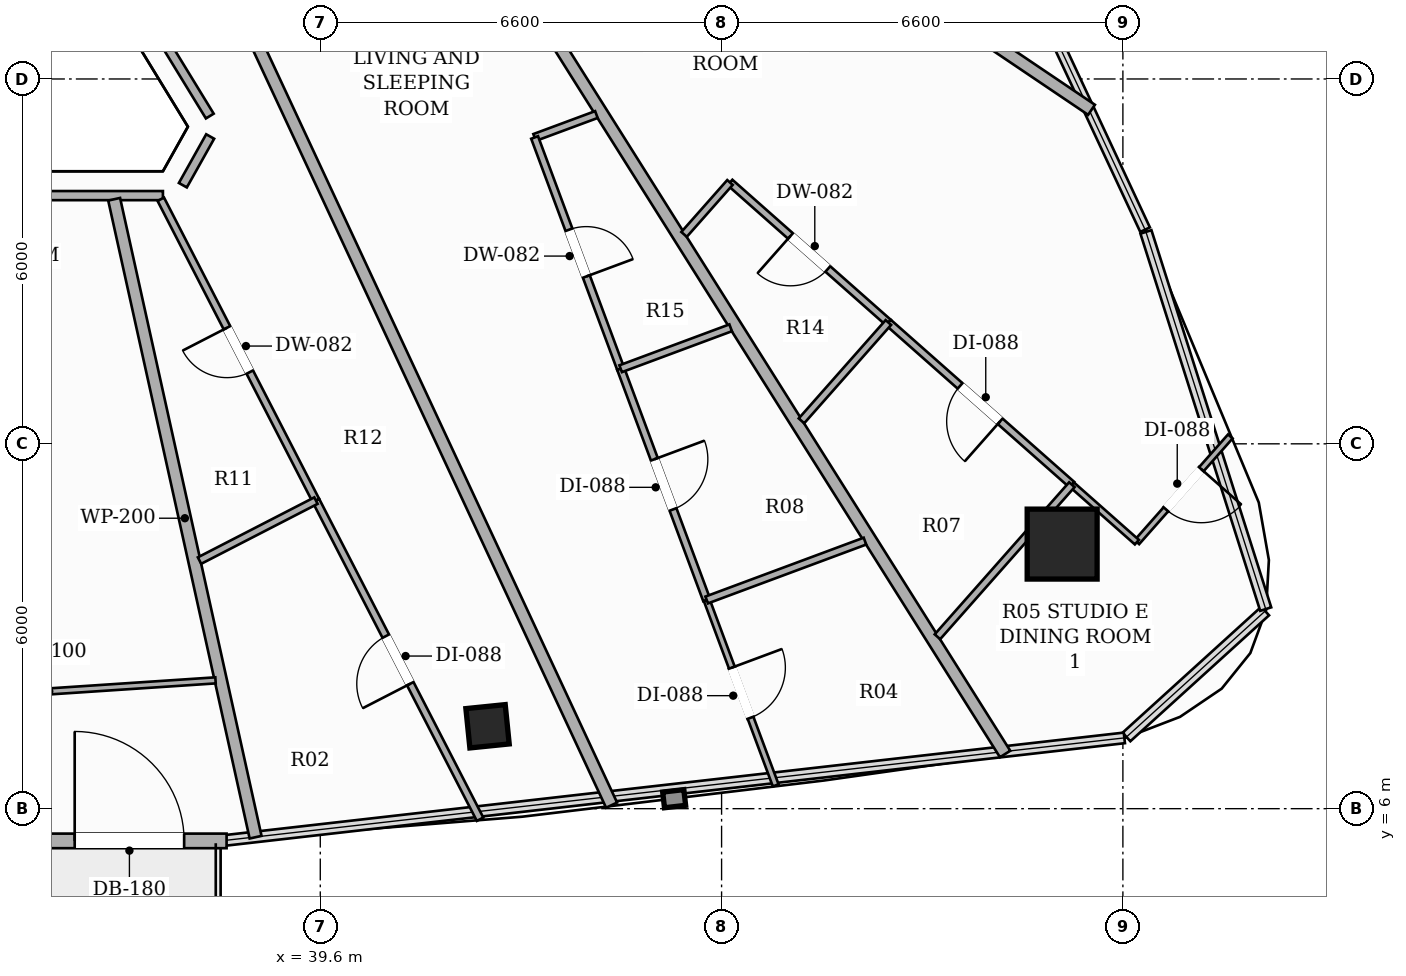
"""IFC4 building model, lengths in metres.
Left out: names, types, materials, properties, quantities, classifications, styles, units other than length and angle.
Written with IfcOpenShell. Run it as: python <this file> out.ifc"""

import sys

from ifc_helpers import new_model, si_unit, direction, frame, frame_2d, origin, origin_2d, place, context, subcontext, project, spatial, rectangle, hollow_rectangle, extrude, element, fill, save


model = new_model("IFC4")
c1 = context("Model", 3, precision=1e-05, world=origin(), true_north=direction((0.0, 1.0)))
c2 = subcontext(c1, "Body", "Model", "MODEL_VIEW")
j1 = project(units=[si_unit("LENGTHUNIT", "METRE"), si_unit("PLANEANGLEUNIT", "RADIAN")], contexts=[c1])
p1 = place(None, origin())
s1 = spatial("IfcSite", under=j1, at=p1, CompositionType="ELEMENT")
p2 = place(p1, origin())
s2 = spatial("IfcBuilding", under=s1, at=p2, CompositionType="ELEMENT")
p3 = place(p2, frame((0.0, 0.0, 256.85)))
s3 = spatial("IfcBuildingStorey", under=s2, at=p3, CompositionType="ELEMENT", Elevation=256.85)
p4 = place(p3, frame((51.801, 10.351, 0.0), z_axis=(0.0, 0.0, 1.0), x_axis=(1.0, 0.0, 0.0)))
e1 = element("IfcColumn", 1, at=p4, inside=s3, PredefinedType="COLUMN", context=c2, shape_type="SweptSolid", body=[
    extrude(hollow_rectangle(XDim=1.15, YDim=1.15, WallThickness=0.036, at=origin_2d()), origin(), (0.0, 0.0, 1.0), 3.3),
])
p5 = place(p3, frame((42.351, 7.355, 0.0), z_axis=(0.0, 0.0, 1.0), x_axis=(0.994880708829, 0.101056297183, 0.0)))
e2 = element("IfcColumn", 2, at=p5, inside=s3, PredefinedType="COLUMN", context=c2, shape_type="SweptSolid", body=[
    extrude(hollow_rectangle(XDim=0.65, YDim=0.65, WallThickness=0.022, at=origin_2d()), origin(), (0.0, 0.0, 1.0), 3.3),
])
p6 = place(p3, frame((27.941, 5.47, 0.0), z_axis=(0.0, 0.0, 1.0), x_axis=(1.0, 0.0, 0.0)))
e3 = element("IfcWall", 3, at=p6, inside=s3, PredefinedType="SOLIDWALL", context=c2, shape_type="SweptSolid", body=[
    extrude(rectangle(XDim=10.118, YDim=0.24, at=frame_2d((5.059, 0.0))), origin(), (0.0, 0.0, 1.0), 2.624),
])
p7 = place(p6, frame((7.62, 0.0, 0.0)))
e4 = element("IfcOpeningElement", 4, at=p7, cuts=e3, PredefinedType="OPENING", context=c2, shape_type="SweptSolid", body=[
    extrude(rectangle(XDim=1.8, YDim=2.2, at=frame_2d((0.9, 1.1))), frame((0.0, 0.13, 0.0), z_axis=(0.0, -1.0, 0.0), x_axis=(1.0, 0.0, 0.0)), (0.0, 0.0, 1.0), 0.26),
])
p8 = place(p3, frame((33.866, 23.79, 0.0), z_axis=(0.0, 0.0, 1.0), x_axis=(0.522011859837, -0.852938226479, 0.0)))
e5 = element("IfcWall", 5, at=p8, inside=s3, PredefinedType="PARTITIONING", context=c2, shape_type="SweptSolid", body=[
    extrude(rectangle(XDim=7.504, YDim=0.15, at=frame_2d((3.752, 0.0))), origin(), (0.0, 0.0, 1.0), 2.773),
])
p9 = place(p3, frame((37.789, 17.054, 0.0), z_axis=(0.0, 0.0, 1.0), x_axis=(-0.488935266506, -0.872320070368, 0.0)))
e6 = element("IfcWall", 6, at=p9, inside=s3, PredefinedType="PARTITIONING", context=c2, shape_type="SweptSolid", body=[
    extrude(rectangle(XDim=0.918, YDim=0.15, at=frame_2d((0.459, 0.0))), origin(), (0.0, 0.0, 1.0), 3.06),
])
p10 = place(p3, frame((37.012, 16.082, 0.0), z_axis=(0.0, 0.0, 1.0), x_axis=(-1.0, 0.0, 0.0)))
e7 = element("IfcWall", 7, at=p10, inside=s3, PredefinedType="PARTITIONING", context=c2, shape_type="SweptSolid", body=[
    extrude(rectangle(XDim=8.024, YDim=0.15, at=frame_2d((4.012, 0.0))), origin(), (0.0, 0.0, 1.0), 2.773),
])
p11 = place(p3, frame((36.21, 16.022, 0.0), z_axis=(0.0, 0.0, 1.0), x_axis=(0.216451711791, -0.976293325012, 0.0)))
e8 = element("IfcWall", 8, at=p11, inside=s3, PredefinedType="PARTITIONING", context=c2, shape_type="SweptSolid", body=[
    extrude(rectangle(XDim=10.746, YDim=0.2, at=frame_2d((5.373, 0.0))), origin(), (0.0, 0.0, 1.0), 2.492),
])
p12 = place(p3, frame((52.284, 17.493, 0.0), z_axis=(0.0, 0.0, 1.0), x_axis=(-0.829053532208, 0.559169241584, 0.0)))
e9 = element("IfcWall", 9, at=p12, inside=s3, PredefinedType="PARTITIONING", context=c2, shape_type="SweptSolid", body=[
    extrude(rectangle(XDim=12.031, YDim=0.2, at=frame_2d((6.015, 0.0))), origin(), (0.0, 0.0, 1.0), 2.492),
])
p13 = place(p3, frame((50.863, 6.899, 0.0), z_axis=(0.0, 0.0, 1.0), x_axis=(-0.532843438342, 0.846213844259, 0.0)))
e10 = element("IfcWall", 10, at=p13, inside=s3, PredefinedType="PARTITIONING", context=c2, shape_type="SweptSolid", body=[
    extrude(rectangle(XDim=19.961, YDim=0.2, at=frame_2d((9.98, 0.0))), origin(), (0.0, 0.0, 1.0), 2.492),
])
p14 = place(p3, frame((44.391, 6.058, 0.0), z_axis=(0.0, 0.0, 1.0), x_axis=(-0.422434507673, 0.906393450289, 0.0)))
e11 = element("IfcWall", 11, at=p14, inside=s3, PredefinedType="PARTITIONING", context=c2, shape_type="SweptSolid", body=[
    extrude(rectangle(XDim=19.563, YDim=0.2, at=frame_2d((9.782, 0.0))), origin(), (0.0, 0.0, 1.0), 2.492),
])
p15 = place(p3, frame((37.877, 8.11, 0.0), z_axis=(0.0, 0.0, 1.0), x_axis=(-0.997794804299, -0.066374155471, 0.0)))
e12 = element("IfcWall", 12, at=p15, inside=s3, PredefinedType="PARTITIONING", context=c2, shape_type="SweptSolid", body=[
    extrude(rectangle(XDim=10.851, YDim=0.1, at=frame_2d((5.425, 0.0))), origin(), (0.0, 0.0, 1.0), 2.492),
])
p16 = place(p15, frame((5.581, 0.0, 0.0)))
e13 = element("IfcOpeningElement", 13, at=p16, cuts=e12, PredefinedType="OPENING", context=c2, shape_type="SweptSolid", body=[
    extrude(rectangle(XDim=0.88, YDim=2.1, at=frame_2d((0.44, 1.05))), frame((0.0, 0.06, 0.0), z_axis=(0.0, -1.0, 0.0), x_axis=(1.0, 0.0, 0.0)), (0.0, 0.0, 1.0), 0.12),
])
p17 = place(p3, frame((48.943, 13.995, 0.0), z_axis=(0.0, 0.0, 1.0), x_axis=(-0.749231040751, 0.662308725275, 0.0)))
e14 = element("IfcWall", 14, at=p17, inside=s3, PredefinedType="PARTITIONING", context=c2, shape_type="SweptSolid", body=[
    extrude(rectangle(XDim=3.477, YDim=0.12, at=frame_2d((1.739, 0.0))), origin(), (0.0, 0.0, 1.0), 2.565),
])
p18 = place(p17, frame((1.329, 0.0, 0.0)))
e15 = element("IfcOpeningElement", 15, at=p18, cuts=e14, PredefinedType="OPENING", context=c2, shape_type="SweptSolid", body=[
    extrude(rectangle(XDim=0.82, YDim=2.1, at=frame_2d((0.41, 1.05))), frame((0.0, 0.07, 0.0), z_axis=(0.0, -1.0, 0.0), x_axis=(1.0, 0.0, 0.0)), (0.0, 0.0, 1.0), 0.14),
])
p19 = place(p3, frame((46.338, 16.298, 0.0), z_axis=(0.0, 0.0, 1.0), x_axis=(-0.662287293934, -0.749249985181, 0.0)))
e16 = element("IfcWall", 16, at=p19, inside=s3, PredefinedType="PARTITIONING", context=c2, shape_type="SweptSolid", body=[
    extrude(rectangle(XDim=1.14, YDim=0.12, at=frame_2d((0.57, 0.0))), origin(), (0.0, 0.0, 1.0), 3.06),
])
p20 = place(p3, frame((51.961, 11.328, 0.0), z_axis=(0.0, 0.0, 1.0), x_axis=(-0.749289212621, 0.662242913024, 0.0)))
e17 = element("IfcWall", 17, at=p20, inside=s3, PredefinedType="PARTITIONING", context=c2, shape_type="SweptSolid", body=[
    extrude(rectangle(XDim=4.028, YDim=0.12, at=frame_2d((2.014, 0.0))), origin(), (0.0, 0.0, 1.0), 2.492),
])
p21 = place(p20, frame((1.574, 0.0, 0.0)))
e18 = element("IfcOpeningElement", 18, at=p21, cuts=e17, PredefinedType="OPENING", context=c2, shape_type="SweptSolid", body=[
    extrude(rectangle(XDim=0.88, YDim=2.1, at=frame_2d((0.44, 1.05))), frame((0.0, 0.07, 0.0), z_axis=(0.0, -1.0, 0.0), x_axis=(1.0, 0.0, 0.0)), (0.0, 0.0, 1.0), 0.14),
])
p22 = place(p3, frame((54.567, 12.122, 0.0), z_axis=(0.0, 0.0, 1.0), x_axis=(-0.662212906575, -0.749315732095, 0.0)))
e19 = element("IfcWall", 19, at=p22, inside=s3, PredefinedType="PARTITIONING", context=c2, shape_type="SweptSolid", body=[
    extrude(rectangle(XDim=2.321, YDim=0.1, at=frame_2d((1.16, 0.0))), origin(), (0.0, 0.0, 1.0), 3.06),
])
p23 = place(p22, frame((0.72, 0.0, 0.0)))
e20 = element("IfcOpeningElement", 20, at=p23, cuts=e19, PredefinedType="OPENING", context=c2, shape_type="SweptSolid", body=[
    extrude(rectangle(XDim=0.88, YDim=2.1, at=frame_2d((0.44, 1.05))), frame((0.0, 0.06, 0.0), z_axis=(0.0, -1.0, 0.0), x_axis=(1.0, 0.0, 0.0)), (0.0, 0.0, 1.0), 0.12),
])
p24 = place(p3, frame((53.03, 10.383, 0.0), z_axis=(0.0, 0.0, 1.0), x_axis=(-0.749313288423, 0.66221567166, 0.0)))
e21 = element("IfcWall", 21, at=p24, inside=s3, PredefinedType="PARTITIONING", context=c2, shape_type="SweptSolid", body=[
    extrude(rectangle(XDim=1.427, YDim=0.1, at=frame_2d((0.713, 0.0))), origin(), (0.0, 0.0, 1.0), 2.492),
])
p25 = place(p3, frame((48.943, 13.995, 0.0), z_axis=(0.0, 0.0, 1.0), x_axis=(-0.662212567735, -0.749316031547, 0.0)))
e22 = element("IfcWall", 22, at=p25, inside=s3, PredefinedType="PARTITIONING", context=c2, shape_type="SweptSolid", body=[
    extrude(rectangle(XDim=2.158, YDim=0.12, at=frame_2d((1.079, 0.0))), origin(), (0.0, 0.0, 1.0), 2.565),
])
p26 = place(p3, frame((51.961, 11.328, 0.0), z_axis=(0.0, 0.0, 1.0), x_axis=(-0.662327669466, -0.74921429395, 0.0)))
e23 = element("IfcWall", 23, at=p26, inside=s3, PredefinedType="PARTITIONING", context=c2, shape_type="SweptSolid", body=[
    extrude(rectangle(XDim=3.338, YDim=0.12, at=frame_2d((1.669, 0.0))), origin(), (0.0, 0.0, 1.0), 2.492),
])
p27 = place(p3, frame((44.141, 17.415, 0.0), z_axis=(0.0, 0.0, 1.0), x_axis=(-0.937563848777, -0.347813210599, 0.0)))
e24 = element("IfcWall", 24, at=p27, inside=s3, PredefinedType="PARTITIONING", context=c2, shape_type="SweptSolid", body=[
    extrude(rectangle(XDim=1.084, YDim=0.12, at=frame_2d((0.542, 0.0))), origin(), (0.0, 0.0, 1.0), 2.773),
])
p28 = place(p3, frame((43.125, 17.038, 0.0), z_axis=(0.0, 0.0, 1.0), x_axis=(0.348728795746, -0.937223680355, 0.0)))
e25 = element("IfcWall", 25, at=p28, inside=s3, PredefinedType="PARTITIONING", context=c2, shape_type="SweptSolid", body=[
    extrude(rectangle(XDim=4.058, YDim=0.12, at=frame_2d((2.029, 0.0))), origin(), (0.0, 0.0, 1.0), 2.773),
])
p29 = place(p28, frame((1.619, 0.0, 0.0)))
e26 = element("IfcOpeningElement", 26, at=p29, cuts=e25, PredefinedType="OPENING", context=c2, shape_type="SweptSolid", body=[
    extrude(rectangle(XDim=0.82, YDim=2.1, at=frame_2d((0.41, 1.05))), frame((0.0, 0.07, 0.0), z_axis=(0.0, -1.0, 0.0), x_axis=(1.0, 0.0, 0.0)), (0.0, 0.0, 1.0), 0.14),
])
p30 = place(p3, frame((44.54, 13.235, 0.0), z_axis=(0.0, 0.0, 1.0), x_axis=(0.348709131935, -0.937230996769, 0.0)))
e27 = element("IfcWall", 27, at=p30, inside=s3, PredefinedType="PARTITIONING", context=c2, shape_type="SweptSolid", body=[
    extrude(rectangle(XDim=4.058, YDim=0.12, at=frame_2d((2.029, 0.0))), origin(), (0.0, 0.0, 1.0), 3.06),
])
p31 = place(p30, frame((1.589, 0.0, 0.0)))
e28 = element("IfcOpeningElement", 28, at=p31, cuts=e27, PredefinedType="OPENING", context=c2, shape_type="SweptSolid", body=[
    extrude(rectangle(XDim=0.88, YDim=2.1, at=frame_2d((0.44, 1.05))), frame((0.0, 0.07, 0.0), z_axis=(0.0, -1.0, 0.0), x_axis=(1.0, 0.0, 0.0)), (0.0, 0.0, 1.0), 0.14),
])
p32 = place(p3, frame((45.955, 9.432, 0.0), z_axis=(0.0, 0.0, 1.0), x_axis=(0.34888547359, -0.937165367647, 0.0)))
e29 = element("IfcWall", 29, at=p32, inside=s3, PredefinedType="PARTITIONING", context=c2, shape_type="SweptSolid", body=[
    extrude(rectangle(XDim=3.253, YDim=0.1, at=frame_2d((1.626, 0.0))), origin(), (0.0, 0.0, 1.0), 2.492),
])
p33 = place(p32, frame((1.187, 0.0, 0.0)))
e30 = element("IfcOpeningElement", 30, at=p33, cuts=e29, PredefinedType="OPENING", context=c2, shape_type="SweptSolid", body=[
    extrude(rectangle(XDim=0.88, YDim=2.1, at=frame_2d((0.44, 1.05))), frame((0.0, 0.06, 0.0), z_axis=(0.0, -1.0, 0.0), x_axis=(1.0, 0.0, 0.0)), (0.0, 0.0, 1.0), 0.12),
])
p34 = place(p3, frame((46.349, 13.908, 0.0), z_axis=(0.0, 0.0, 1.0), x_axis=(-0.937271835507, -0.348599349347, 0.0)))
e31 = element("IfcWall", 31, at=p34, inside=s3, PredefinedType="PARTITIONING", context=c2, shape_type="SweptSolid", body=[
    extrude(rectangle(XDim=1.93, YDim=0.12, at=frame_2d((0.965, 0.0))), origin(), (0.0, 0.0, 1.0), 2.773),
])
p35 = place(p3, frame((48.558, 10.4, 0.0), z_axis=(0.0, 0.0, 1.0), x_axis=(-0.937286649549, -0.34855951655, 0.0)))
e32 = element("IfcWall", 32, at=p35, inside=s3, PredefinedType="PARTITIONING", context=c2, shape_type="SweptSolid", body=[
    extrude(rectangle(XDim=2.777, YDim=0.12, at=frame_2d((1.389, 0.0))), origin(), (0.0, 0.0, 1.0), 2.773),
])
p36 = place(p3, frame((39.529, 11.066, 0.0), z_axis=(0.0, 0.0, 1.0), x_axis=(-0.457798211716, 0.889056127221, 0.0)))
e33 = element("IfcWall", 33, at=p36, inside=s3, PredefinedType="PARTITIONING", context=c2, shape_type="SweptSolid", body=[
    extrude(rectangle(XDim=5.574, YDim=0.12, at=frame_2d((2.787, 0.0))), origin(), (0.0, 0.0, 1.0), 2.773),
])
p37 = place(p36, frame((2.377, 0.0, 0.0)))
e34 = element("IfcOpeningElement", 34, at=p37, cuts=e33, PredefinedType="OPENING", context=c2, shape_type="SweptSolid", body=[
    extrude(rectangle(XDim=0.82, YDim=2.1, at=frame_2d((0.41, 1.05))), frame((0.0, 0.07, 0.0), z_axis=(0.0, -1.0, 0.0), x_axis=(1.0, 0.0, 0.0)), (0.0, 0.0, 1.0), 0.14),
])
p38 = place(p3, frame((42.228, 5.826, 0.0), z_axis=(0.0, 0.0, 1.0), x_axis=(-0.457901041138, 0.889003170143, 0.0)))
e35 = element("IfcWall", 35, at=p38, inside=s3, PredefinedType="PARTITIONING", context=c2, shape_type="SweptSolid", body=[
    extrude(rectangle(XDim=5.894, YDim=0.12, at=frame_2d((2.947, 0.0))), origin(), (0.0, 0.0, 1.0), 2.492),
])
p39 = place(p38, frame((2.507, 0.0, 0.0)))
e36 = element("IfcOpeningElement", 36, at=p39, cuts=e35, PredefinedType="OPENING", context=c2, shape_type="SweptSolid", body=[
    extrude(rectangle(XDim=0.88, YDim=2.1, at=frame_2d((0.44, 1.05))), frame((0.0, 0.07, 0.0), z_axis=(0.0, -1.0, 0.0), x_axis=(1.0, 0.0, 0.0)), (0.0, 0.0, 1.0), 0.14),
])
p40 = place(p3, frame((39.529, 11.066, 0.0), z_axis=(0.0, 0.0, 1.0), x_axis=(-0.889105964634, -0.457701413207, 0.0)))
e37 = element("IfcWall", 37, at=p40, inside=s3, PredefinedType="PARTITIONING", context=c2, shape_type="SweptSolid", body=[
    extrude(rectangle(XDim=2.154, YDim=0.12, at=frame_2d((1.077, 0.0))), origin(), (0.0, 0.0, 1.0), 2.773),
])
p41 = place(p7, origin())
e38 = element("IfcDoor", 38, at=p41, inside=s3, OperationType="SINGLE_SWING_LEFT", PredefinedType="DOOR", context=c2, shape_type="SweptSolid", body=[
    extrude(rectangle(XDim=1.8, YDim=2.2, at=frame_2d((0.9, 1.1))), frame((0.0, 0.025, 0.0), z_axis=(0.0, -1.0, 0.0), x_axis=(1.0, 0.0, 0.0)), (0.0, 0.0, 1.0), 0.05),
])
fill(e4, e38)
p42 = place(p18, origin())
e39 = element("IfcDoor", 39, at=p42, inside=s3, OperationType="SINGLE_SWING_RIGHT", PredefinedType="DOOR", context=c2, shape_type="SweptSolid", body=[
    extrude(rectangle(XDim=0.82, YDim=2.1, at=frame_2d((0.41, 1.05))), frame((0.0, 0.025, 0.0), z_axis=(0.0, -1.0, 0.0), x_axis=(1.0, 0.0, 0.0)), (0.0, 0.0, 1.0), 0.05),
])
fill(e15, e39)
p43 = place(p21, origin())
e40 = element("IfcDoor", 40, at=p43, inside=s3, OperationType="SINGLE_SWING_LEFT", PredefinedType="DOOR", context=c2, shape_type="SweptSolid", body=[
    extrude(rectangle(XDim=0.88, YDim=2.1, at=frame_2d((0.44, 1.05))), frame((0.0, 0.025, 0.0), z_axis=(0.0, -1.0, 0.0), x_axis=(1.0, 0.0, 0.0)), (0.0, 0.0, 1.0), 0.05),
])
fill(e18, e40)
p44 = place(p23, origin())
e41 = element("IfcDoor", 41, at=p44, inside=s3, OperationType="SINGLE_SWING_LEFT", PredefinedType="DOOR", context=c2, shape_type="SweptSolid", body=[
    extrude(rectangle(XDim=0.88, YDim=2.1, at=frame_2d((0.44, 1.05))), frame((0.0, 0.025, 0.0), z_axis=(0.0, -1.0, 0.0), x_axis=(1.0, 0.0, 0.0)), (0.0, 0.0, 1.0), 0.05),
])
fill(e20, e41)
p45 = place(p29, origin())
e42 = element("IfcDoor", 42, at=p45, inside=s3, OperationType="SINGLE_SWING_RIGHT", PredefinedType="DOOR", context=c2, shape_type="SweptSolid", body=[
    extrude(rectangle(XDim=0.82, YDim=2.1, at=frame_2d((0.41, 1.05))), frame((0.0, 0.025, 0.0), z_axis=(0.0, -1.0, 0.0), x_axis=(1.0, 0.0, 0.0)), (0.0, 0.0, 1.0), 0.05),
])
fill(e26, e42)
p46 = place(p31, origin())
e43 = element("IfcDoor", 43, at=p46, inside=s3, OperationType="SINGLE_SWING_LEFT", PredefinedType="DOOR", context=c2, shape_type="SweptSolid", body=[
    extrude(rectangle(XDim=0.88, YDim=2.1, at=frame_2d((0.44, 1.05))), frame((0.0, 0.025, 0.0), z_axis=(0.0, -1.0, 0.0), x_axis=(1.0, 0.0, 0.0)), (0.0, 0.0, 1.0), 0.05),
])
fill(e28, e43)
p47 = place(p33, origin())
e44 = element("IfcDoor", 44, at=p47, inside=s3, OperationType="SINGLE_SWING_LEFT", PredefinedType="DOOR", context=c2, shape_type="SweptSolid", body=[
    extrude(rectangle(XDim=0.88, YDim=2.1, at=frame_2d((0.44, 1.05))), frame((0.0, 0.025, 0.0), z_axis=(0.0, -1.0, 0.0), x_axis=(1.0, 0.0, 0.0)), (0.0, 0.0, 1.0), 0.05),
])
fill(e30, e44)
p48 = place(p37, origin())
e45 = element("IfcDoor", 45, at=p48, inside=s3, OperationType="SINGLE_SWING_RIGHT", PredefinedType="DOOR", context=c2, shape_type="SweptSolid", body=[
    extrude(rectangle(XDim=0.82, YDim=2.1, at=frame_2d((0.41, 1.05))), frame((0.0, 0.025, 0.0), z_axis=(0.0, -1.0, 0.0), x_axis=(1.0, 0.0, 0.0)), (0.0, 0.0, 1.0), 0.05),
])
fill(e34, e45)
p49 = place(p39, origin())
e46 = element("IfcDoor", 46, at=p49, inside=s3, OperationType="SINGLE_SWING_LEFT", PredefinedType="DOOR", context=c2, shape_type="SweptSolid", body=[
    extrude(rectangle(XDim=0.88, YDim=2.1, at=frame_2d((0.44, 1.05))), frame((0.0, 0.025, 0.0), z_axis=(0.0, -1.0, 0.0), x_axis=(1.0, 0.0, 0.0)), (0.0, 0.0, 1.0), 0.05),
])
fill(e36, e46)
save(model, sys.argv[1])
